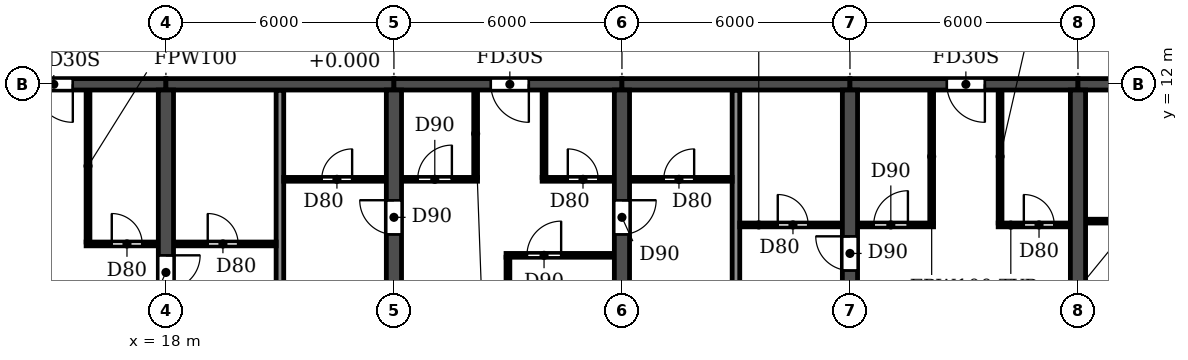
"""IFC4 building model, lengths in metres.
Left out: names, types, materials, properties, quantities, classifications, styles, units other than length and angle.
Written with IfcOpenShell. Run it as: python <this file> out.ifc"""

import sys

from ifc_helpers import new_model, si_unit, direction, frame, frame_2d, origin, place, context, subcontext, project, spatial, rectangle, extrude, element, fill, save


model = new_model("IFC4")
c1 = context("Model", 3, precision=1e-05, world=origin(), true_north=direction((0.0, 1.0)))
c2 = subcontext(c1, "Body", "Model", "MODEL_VIEW")
j1 = project(units=[si_unit("LENGTHUNIT", "METRE"), si_unit("PLANEANGLEUNIT", "RADIAN")], contexts=[c1])
p1 = place(None, origin())
s1 = spatial("IfcSite", under=j1, at=p1, CompositionType="ELEMENT")
p2 = place(p1, origin())
s2 = spatial("IfcBuilding", under=s1, at=p2, CompositionType="ELEMENT")
p3 = place(p2, frame((0.0, 0.0, 49.8)))
s3 = spatial("IfcBuildingStorey", under=s2, at=p3, CompositionType="ELEMENT", Elevation=49.8)
p4 = place(p3, frame((18.0, 0.2, 0.0), z_axis=(0.0, 0.0, 1.0), x_axis=(0.0, 1.0, 0.0)))
e1 = element("IfcWall", 1, at=p4, inside=s3, PredefinedType="SHEAR", context=c2, shape_type="SweptSolid", body=[
    extrude(rectangle(XDim=11.65, YDim=0.4, at=frame_2d((5.825, 0.0))), origin(), (0.0, 0.0, 1.0), 3.0),
])
p5 = place(p4, frame((6.4, 0.0, 0.0)))
e2 = element("IfcOpeningElement", 2, at=p5, cuts=e1, PredefinedType="OPENING", context=c2, shape_type="SweptSolid", body=[
    extrude(rectangle(XDim=0.9, YDim=2.1, at=frame_2d((0.45, 1.05))), frame((0.0, 0.21, 0.0), z_axis=(0.0, -1.0, 0.0), x_axis=(1.0, 0.0, 0.0)), (0.0, 0.0, 1.0), 0.42),
])
p6 = place(p3, frame((24.0, 0.2, 0.0), z_axis=(0.0, 0.0, 1.0), x_axis=(0.0, 1.0, 0.0)))
e3 = element("IfcWall", 3, at=p6, inside=s3, PredefinedType="SHEAR", context=c2, shape_type="SweptSolid", body=[
    extrude(rectangle(XDim=11.65, YDim=0.4, at=frame_2d((5.825, 0.0))), origin(), (0.0, 0.0, 1.0), 3.0),
])
p7 = place(p6, frame((7.85, 0.0, 0.0)))
e4 = element("IfcOpeningElement", 4, at=p7, cuts=e3, PredefinedType="OPENING", context=c2, shape_type="SweptSolid", body=[
    extrude(rectangle(XDim=0.9, YDim=2.1, at=frame_2d((0.45, 1.05))), frame((0.0, 0.21, 0.0), z_axis=(0.0, -1.0, 0.0), x_axis=(1.0, 0.0, 0.0)), (0.0, 0.0, 1.0), 0.42),
])
p8 = place(p3, frame((30.0, 0.2, 0.0), z_axis=(0.0, 0.0, 1.0), x_axis=(0.0, 1.0, 0.0)))
e5 = element("IfcWall", 5, at=p8, inside=s3, PredefinedType="SHEAR", context=c2, shape_type="SweptSolid", body=[
    extrude(rectangle(XDim=11.65, YDim=0.4, at=frame_2d((5.825, 0.0))), origin(), (0.0, 0.0, 1.0), 3.0),
])
p9 = place(p8, frame((7.85, 0.0, 0.0)))
e6 = element("IfcOpeningElement", 6, at=p9, cuts=e5, PredefinedType="OPENING", context=c2, shape_type="SweptSolid", body=[
    extrude(rectangle(XDim=0.9, YDim=2.1, at=frame_2d((0.45, 1.05))), frame((0.0, 0.21, 0.0), z_axis=(0.0, -1.0, 0.0), x_axis=(1.0, 0.0, 0.0)), (0.0, 0.0, 1.0), 0.42),
])
p10 = place(p3, frame((36.0, 0.2, 0.0), z_axis=(0.0, 0.0, 1.0), x_axis=(0.0, 1.0, 0.0)))
e7 = element("IfcWall", 7, at=p10, inside=s3, PredefinedType="SHEAR", context=c2, shape_type="SweptSolid", body=[
    extrude(rectangle(XDim=11.65, YDim=0.4, at=frame_2d((5.825, 0.0))), origin(), (0.0, 0.0, 1.0), 3.0),
])
p11 = place(p10, frame((6.9, 0.0, 0.0)))
e8 = element("IfcOpeningElement", 8, at=p11, cuts=e7, PredefinedType="OPENING", context=c2, shape_type="SweptSolid", body=[
    extrude(rectangle(XDim=0.9, YDim=2.1, at=frame_2d((0.45, 1.05))), frame((0.0, 0.21, 0.0), z_axis=(0.0, -1.0, 0.0), x_axis=(1.0, 0.0, 0.0)), (0.0, 0.0, 1.0), 0.42),
])
p12 = place(p3, frame((42.0, 0.2, 0.0), z_axis=(0.0, 0.0, 1.0), x_axis=(0.0, 1.0, 0.0)))
e9 = element("IfcWall", 9, at=p12, inside=s3, PredefinedType="SHEAR", context=c2, shape_type="SweptSolid", body=[
    extrude(rectangle(XDim=11.65, YDim=0.4, at=frame_2d((5.825, 0.0))), origin(), (0.0, 0.0, 1.0), 3.0),
])
p13 = place(p3, frame((12.0, 12.0, 0.0), z_axis=(0.0, 0.0, 1.0), x_axis=(1.0, 0.0, 0.0)))
e10 = element("IfcWall", 10, at=p13, inside=s3, PredefinedType="SHEAR", context=c2, shape_type="SweptSolid", body=[
    extrude(rectangle(XDim=6.0, YDim=0.3, at=frame_2d((3.0, 0.0))), origin(), (0.0, 0.0, 1.0), 2.4),
])
p14 = place(p13, frame((2.55, 0.0, 0.0)))
e11 = element("IfcOpeningElement", 11, at=p14, cuts=e10, PredefinedType="OPENING", context=c2, shape_type="SweptSolid", body=[
    extrude(rectangle(XDim=1.0, YDim=2.1, at=frame_2d((0.5, 1.05))), frame((0.0, 0.16, 0.0), z_axis=(0.0, -1.0, 0.0), x_axis=(1.0, 0.0, 0.0)), (0.0, 0.0, 1.0), 0.32),
])
p15 = place(p3, frame((18.0, 12.0, 0.0), z_axis=(0.0, 0.0, 1.0), x_axis=(1.0, 0.0, 0.0)))
e12 = element("IfcWall", 12, at=p15, inside=s3, PredefinedType="SHEAR", context=c2, shape_type="SweptSolid", body=[
    extrude(rectangle(XDim=6.0, YDim=0.3, at=frame_2d((3.0, 0.0))), origin(), (0.0, 0.0, 1.0), 2.4),
])
p16 = place(p3, frame((24.0, 12.0, 0.0), z_axis=(0.0, 0.0, 1.0), x_axis=(1.0, 0.0, 0.0)))
e13 = element("IfcWall", 13, at=p16, inside=s3, PredefinedType="SHEAR", context=c2, shape_type="SweptSolid", body=[
    extrude(rectangle(XDim=6.0, YDim=0.3, at=frame_2d((3.0, 0.0))), origin(), (0.0, 0.0, 1.0), 2.4),
])
p17 = place(p16, frame((2.55, 0.0, 0.0)))
e14 = element("IfcOpeningElement", 14, at=p17, cuts=e13, PredefinedType="OPENING", context=c2, shape_type="SweptSolid", body=[
    extrude(rectangle(XDim=1.0, YDim=2.1, at=frame_2d((0.5, 1.05))), frame((0.0, 0.16, 0.0), z_axis=(0.0, -1.0, 0.0), x_axis=(1.0, 0.0, 0.0)), (0.0, 0.0, 1.0), 0.32),
])
p18 = place(p3, frame((30.0, 12.0, 0.0), z_axis=(0.0, 0.0, 1.0), x_axis=(1.0, 0.0, 0.0)))
e15 = element("IfcWall", 15, at=p18, inside=s3, PredefinedType="SHEAR", context=c2, shape_type="SweptSolid", body=[
    extrude(rectangle(XDim=6.0, YDim=0.3, at=frame_2d((3.0, 0.0))), origin(), (0.0, 0.0, 1.0), 2.4),
])
p19 = place(p3, frame((36.0, 12.0, 0.0), z_axis=(0.0, 0.0, 1.0), x_axis=(1.0, 0.0, 0.0)))
e16 = element("IfcWall", 16, at=p19, inside=s3, PredefinedType="SHEAR", context=c2, shape_type="SweptSolid", body=[
    extrude(rectangle(XDim=6.0, YDim=0.3, at=frame_2d((3.0, 0.0))), origin(), (0.0, 0.0, 1.0), 2.4),
])
p20 = place(p19, frame((2.55, 0.0, 0.0)))
e17 = element("IfcOpeningElement", 17, at=p20, cuts=e16, PredefinedType="OPENING", context=c2, shape_type="SweptSolid", body=[
    extrude(rectangle(XDim=1.0, YDim=2.1, at=frame_2d((0.5, 1.05))), frame((0.0, 0.16, 0.0), z_axis=(0.0, -1.0, 0.0), x_axis=(1.0, 0.0, 0.0)), (0.0, 0.0, 1.0), 0.32),
])
p21 = place(p3, frame((42.0, 12.0, 0.0), z_axis=(0.0, 0.0, 1.0), x_axis=(1.0, 0.0, 0.0)))
e18 = element("IfcWall", 18, at=p21, inside=s3, PredefinedType="SHEAR", context=c2, shape_type="SweptSolid", body=[
    extrude(rectangle(XDim=6.0, YDim=0.3, at=frame_2d((3.0, 0.0))), origin(), (0.0, 0.0, 1.0), 2.4),
])
p22 = place(p21, frame((2.45, 0.0, 0.0)))
e19 = element("IfcOpeningElement", 19, at=p22, cuts=e18, PredefinedType="OPENING", context=c2, shape_type="SweptSolid", body=[
    extrude(rectangle(XDim=1.0, YDim=2.1, at=frame_2d((0.5, 1.05))), frame((0.0, 0.16, 0.0), z_axis=(0.0, -1.0, 0.0), x_axis=(1.0, 0.0, 0.0)), (0.0, 0.0, 1.0), 0.32),
])
for number, where, z_axis, x_axis in (
    (20, (21.0, 0.06, 0.0), (0.0, 0.0, 1.0), (0.0, 1.0, 0.0)),
    (21, (33.0, 0.06, 0.0), (0.0, 0.0, 1.0), (0.0, 1.0, 0.0)),
):
    element("IfcWall", number, at=place(p3, frame(where, z_axis=z_axis, x_axis=x_axis)), inside=s3, PredefinedType="PARTITIONING", context=c2, shape_type="SweptSolid", body=[
        extrude(rectangle(XDim=11.78, YDim=0.2, at=frame_2d((5.89, 0.0))), origin(), (0.0, 0.0, 1.0), 3.0),
    ])
p23 = place(p3, frame((26.95, 7.5, 0.0), z_axis=(0.0, 0.0, 1.0), x_axis=(1.0, 0.0, 0.0)))
e22 = element("IfcWall", 22, at=p23, inside=s3, PredefinedType="PARTITIONING", context=c2, shape_type="SweptSolid", body=[
    extrude(rectangle(XDim=2.84, YDim=0.1, at=frame_2d((1.42, 0.0))), origin(), (0.0, 0.0, 1.0), 3.0),
])
p24 = place(p23, frame((0.55, 0.0, 0.0)))
e23 = element("IfcOpeningElement", 23, at=p24, cuts=e22, PredefinedType="OPENING", context=c2, shape_type="SweptSolid", body=[
    extrude(rectangle(XDim=0.9, YDim=2.1, at=frame_2d((0.45, 1.05))), frame((0.0, 0.06, 0.0), z_axis=(0.0, -1.0, 0.0), x_axis=(1.0, 0.0, 0.0)), (0.0, 0.0, 1.0), 0.12),
])
p25 = place(p3, frame((15.9, 7.8, 0.0), z_axis=(0.0, 0.0, 1.0), x_axis=(1.0, 0.0, 0.0)))
e24 = element("IfcWall", 24, at=p25, inside=s3, PredefinedType="PARTITIONING", context=c2, shape_type="SweptSolid", body=[
    extrude(rectangle(XDim=1.89, YDim=0.1, at=frame_2d((0.945, 0.0))), origin(), (0.0, 0.0, 1.0), 3.0),
])
p26 = place(p25, frame((0.675, 0.0, 0.0)))
e25 = element("IfcOpeningElement", 25, at=p26, cuts=e24, PredefinedType="OPENING", context=c2, shape_type="SweptSolid", body=[
    extrude(rectangle(XDim=0.8, YDim=2.1, at=frame_2d((0.4, 1.05))), frame((0.0, 0.06, 0.0), z_axis=(0.0, -1.0, 0.0), x_axis=(1.0, 0.0, 0.0)), (0.0, 0.0, 1.0), 0.12),
])
p27 = place(p3, frame((18.21, 7.8, 0.0), z_axis=(0.0, 0.0, 1.0), x_axis=(1.0, 0.0, 0.0)))
e26 = element("IfcWall", 26, at=p27, inside=s3, PredefinedType="PARTITIONING", context=c2, shape_type="SweptSolid", body=[
    extrude(rectangle(XDim=2.69, YDim=0.1, at=frame_2d((1.345, 0.0))), origin(), (0.0, 0.0, 1.0), 3.0),
])
p28 = place(p27, frame((0.89, 0.0, 0.0)))
e27 = element("IfcOpeningElement", 27, at=p28, cuts=e26, PredefinedType="OPENING", context=c2, shape_type="SweptSolid", body=[
    extrude(rectangle(XDim=0.8, YDim=2.1, at=frame_2d((0.4, 1.05))), frame((0.0, 0.06, 0.0), z_axis=(0.0, -1.0, 0.0), x_axis=(1.0, 0.0, 0.0)), (0.0, 0.0, 1.0), 0.12),
])
p29 = place(p3, frame((33.1, 8.3, 0.0), z_axis=(0.0, 0.0, 1.0), x_axis=(1.0, 0.0, 0.0)))
e28 = element("IfcWall", 28, at=p29, inside=s3, PredefinedType="PARTITIONING", context=c2, shape_type="SweptSolid", body=[
    extrude(rectangle(XDim=2.69, YDim=0.1, at=frame_2d((1.345, 0.0))), origin(), (0.0, 0.0, 1.0), 3.0),
])
p30 = place(p29, frame((1.0, 0.0, 0.0)))
e29 = element("IfcOpeningElement", 29, at=p30, cuts=e28, PredefinedType="OPENING", context=c2, shape_type="SweptSolid", body=[
    extrude(rectangle(XDim=0.8, YDim=2.1, at=frame_2d((0.4, 1.05))), frame((0.0, 0.06, 0.0), z_axis=(0.0, -1.0, 0.0), x_axis=(1.0, 0.0, 0.0)), (0.0, 0.0, 1.0), 0.12),
])
p31 = place(p3, frame((36.21, 8.3, 0.0), z_axis=(0.0, 0.0, 1.0), x_axis=(1.0, 0.0, 0.0)))
e30 = element("IfcWall", 30, at=p31, inside=s3, PredefinedType="PARTITIONING", context=c2, shape_type="SweptSolid", body=[
    extrude(rectangle(XDim=1.99, YDim=0.1, at=frame_2d((0.995, 0.0))), origin(), (0.0, 0.0, 1.0), 3.0),
])
p32 = place(p31, frame((0.415, 0.0, 0.0)))
e31 = element("IfcOpeningElement", 31, at=p32, cuts=e30, PredefinedType="OPENING", context=c2, shape_type="SweptSolid", body=[
    extrude(rectangle(XDim=0.9, YDim=2.1, at=frame_2d((0.45, 1.05))), frame((0.0, 0.06, 0.0), z_axis=(0.0, -1.0, 0.0), x_axis=(1.0, 0.0, 0.0)), (0.0, 0.0, 1.0), 0.12),
])
p33 = place(p3, frame((39.9, 8.3, 0.0), z_axis=(0.0, 0.0, 1.0), x_axis=(1.0, 0.0, 0.0)))
e32 = element("IfcWall", 32, at=p33, inside=s3, PredefinedType="PARTITIONING", context=c2, shape_type="SweptSolid", body=[
    extrude(rectangle(XDim=1.89, YDim=0.1, at=frame_2d((0.945, 0.0))), origin(), (0.0, 0.0, 1.0), 3.0),
])
p34 = place(p33, frame((0.675, 0.0, 0.0)))
e33 = element("IfcOpeningElement", 33, at=p34, cuts=e32, PredefinedType="OPENING", context=c2, shape_type="SweptSolid", body=[
    extrude(rectangle(XDim=0.8, YDim=2.1, at=frame_2d((0.4, 1.05))), frame((0.0, 0.06, 0.0), z_axis=(0.0, -1.0, 0.0), x_axis=(1.0, 0.0, 0.0)), (0.0, 0.0, 1.0), 0.12),
])
p35 = place(p3, frame((42.21, 8.4, 0.0), z_axis=(0.0, 0.0, 1.0), x_axis=(1.0, 0.0, 0.0)))
e34 = element("IfcWall", 34, at=p35, inside=s3, PredefinedType="PARTITIONING", context=c2, shape_type="SweptSolid", body=[
    extrude(rectangle(XDim=1.89, YDim=0.1, at=frame_2d((0.945, 0.0))), origin(), (0.0, 0.0, 1.0), 3.0),
])
p36 = place(p3, frame((21.1, 9.5, 0.0), z_axis=(0.0, 0.0, 1.0), x_axis=(1.0, 0.0, 0.0)))
e35 = element("IfcWall", 35, at=p36, inside=s3, PredefinedType="PARTITIONING", context=c2, shape_type="SweptSolid", body=[
    extrude(rectangle(XDim=2.69, YDim=0.1, at=frame_2d((1.345, 0.0))), origin(), (0.0, 0.0, 1.0), 3.0),
])
p37 = place(p36, frame((1.0, 0.0, 0.0)))
e36 = element("IfcOpeningElement", 36, at=p37, cuts=e35, PredefinedType="OPENING", context=c2, shape_type="SweptSolid", body=[
    extrude(rectangle(XDim=0.8, YDim=2.1, at=frame_2d((0.4, 1.05))), frame((0.0, 0.06, 0.0), z_axis=(0.0, -1.0, 0.0), x_axis=(1.0, 0.0, 0.0)), (0.0, 0.0, 1.0), 0.12),
])
p38 = place(p3, frame((24.21, 9.5, 0.0), z_axis=(0.0, 0.0, 1.0), x_axis=(1.0, 0.0, 0.0)))
e37 = element("IfcWall", 37, at=p38, inside=s3, PredefinedType="PARTITIONING", context=c2, shape_type="SweptSolid", body=[
    extrude(rectangle(XDim=1.99, YDim=0.1, at=frame_2d((0.995, 0.0))), origin(), (0.0, 0.0, 1.0), 3.0),
])
p39 = place(p38, frame((0.415, 0.0, 0.0)))
e38 = element("IfcOpeningElement", 38, at=p39, cuts=e37, PredefinedType="OPENING", context=c2, shape_type="SweptSolid", body=[
    extrude(rectangle(XDim=0.9, YDim=2.1, at=frame_2d((0.45, 1.05))), frame((0.0, 0.06, 0.0), z_axis=(0.0, -1.0, 0.0), x_axis=(1.0, 0.0, 0.0)), (0.0, 0.0, 1.0), 0.12),
])
p40 = place(p3, frame((27.9, 9.5, 0.0), z_axis=(0.0, 0.0, 1.0), x_axis=(1.0, 0.0, 0.0)))
e39 = element("IfcWall", 39, at=p40, inside=s3, PredefinedType="PARTITIONING", context=c2, shape_type="SweptSolid", body=[
    extrude(rectangle(XDim=1.89, YDim=0.1, at=frame_2d((0.945, 0.0))), origin(), (0.0, 0.0, 1.0), 3.0),
])
p41 = place(p40, frame((0.675, 0.0, 0.0)))
e40 = element("IfcOpeningElement", 40, at=p41, cuts=e39, PredefinedType="OPENING", context=c2, shape_type="SweptSolid", body=[
    extrude(rectangle(XDim=0.8, YDim=2.1, at=frame_2d((0.4, 1.05))), frame((0.0, 0.06, 0.0), z_axis=(0.0, -1.0, 0.0), x_axis=(1.0, 0.0, 0.0)), (0.0, 0.0, 1.0), 0.12),
])
p42 = place(p3, frame((30.21, 9.5, 0.0), z_axis=(0.0, 0.0, 1.0), x_axis=(1.0, 0.0, 0.0)))
e41 = element("IfcWall", 41, at=p42, inside=s3, PredefinedType="PARTITIONING", context=c2, shape_type="SweptSolid", body=[
    extrude(rectangle(XDim=2.69, YDim=0.1, at=frame_2d((1.345, 0.0))), origin(), (0.0, 0.0, 1.0), 3.0),
])
p43 = place(p42, frame((0.89, 0.0, 0.0)))
e42 = element("IfcOpeningElement", 42, at=p43, cuts=e41, PredefinedType="OPENING", context=c2, shape_type="SweptSolid", body=[
    extrude(rectangle(XDim=0.8, YDim=2.1, at=frame_2d((0.4, 1.05))), frame((0.0, 0.06, 0.0), z_axis=(0.0, -1.0, 0.0), x_axis=(1.0, 0.0, 0.0)), (0.0, 0.0, 1.0), 0.12),
])
p44 = place(p3, frame((15.95, 7.85, 0.0), z_axis=(0.0, 0.0, 1.0), x_axis=(0.0, 1.0, 0.0)))
e43 = element("IfcWall", 43, at=p44, inside=s3, PredefinedType="PARTITIONING", context=c2, shape_type="SweptSolid", body=[
    extrude(rectangle(XDim=3.99, YDim=0.1, at=frame_2d((1.995, 0.0))), origin(), (0.0, 0.0, 1.0), 3.0),
])
p45 = place(p3, frame((26.15, 9.55, 0.0), z_axis=(0.0, 0.0, 1.0), x_axis=(0.0, 1.0, 0.0)))
e44 = element("IfcWall", 44, at=p45, inside=s3, PredefinedType="PARTITIONING", context=c2, shape_type="SweptSolid", body=[
    extrude(rectangle(XDim=2.29, YDim=0.1, at=frame_2d((1.145, 0.0))), origin(), (0.0, 0.0, 1.0), 3.0),
])
p46 = place(p3, frame((27.0, 0.06, 0.0), z_axis=(0.0, 0.0, 1.0), x_axis=(0.0, 1.0, 0.0)))
e45 = element("IfcWall", 45, at=p46, inside=s3, PredefinedType="PARTITIONING", context=c2, shape_type="SweptSolid", body=[
    extrude(rectangle(XDim=7.39, YDim=0.1, at=frame_2d((3.695, 0.0))), origin(), (0.0, 0.0, 1.0), 3.0),
])
p47 = place(p3, frame((27.95, 9.55, 0.0), z_axis=(0.0, 0.0, 1.0), x_axis=(0.0, 1.0, 0.0)))
e46 = element("IfcWall", 46, at=p47, inside=s3, PredefinedType="PARTITIONING", context=c2, shape_type="SweptSolid", body=[
    extrude(rectangle(XDim=2.29, YDim=0.1, at=frame_2d((1.145, 0.0))), origin(), (0.0, 0.0, 1.0), 3.0),
])
for number, where, z_axis, x_axis in (
    (47, (38.15, 8.35, 0.0), (0.0, 0.0, 1.0), (0.0, 1.0, 0.0)),
    (48, (39.95, 8.35, 0.0), (0.0, 0.0, 1.0), (0.0, 1.0, 0.0)),
):
    element("IfcWall", number, at=place(p3, frame(where, z_axis=z_axis, x_axis=x_axis)), inside=s3, PredefinedType="PARTITIONING", context=c2, shape_type="SweptSolid", body=[
        extrude(rectangle(XDim=3.49, YDim=0.1, at=frame_2d((1.745, 0.0))), origin(), (0.0, 0.0, 1.0), 3.0),
    ])
p48 = place(p28, origin())
e49 = element("IfcDoor", 49, at=p48, inside=s3, OperationType="SINGLE_SWING_LEFT", PredefinedType="DOOR", context=c2, shape_type="SweptSolid", body=[
    extrude(rectangle(XDim=0.8, YDim=2.1, at=frame_2d((0.4, 1.05))), frame((0.0, 0.025, 0.0), z_axis=(0.0, -1.0, 0.0), x_axis=(1.0, 0.0, 0.0)), (0.0, 0.0, 1.0), 0.05),
])
fill(e27, e49)
p49 = place(p14, frame((1.0, 0.0, 0.0), z_axis=(0.0, 0.0, 1.0), x_axis=(-1.0, 0.0, 0.0)))
e50 = element("IfcDoor", 50, at=p49, inside=s3, OperationType="SINGLE_SWING_LEFT", PredefinedType="DOOR", context=c2, shape_type="SweptSolid", body=[
    extrude(rectangle(XDim=1.0, YDim=2.1, at=frame_2d((0.5, 1.05))), frame((0.0, 0.025, 0.0), z_axis=(0.0, -1.0, 0.0), x_axis=(1.0, 0.0, 0.0)), (0.0, 0.0, 1.0), 0.05),
])
fill(e11, e50)
p50 = place(p26, origin())
e51 = element("IfcDoor", 51, at=p50, inside=s3, OperationType="SINGLE_SWING_LEFT", PredefinedType="DOOR", context=c2, shape_type="SweptSolid", body=[
    extrude(rectangle(XDim=0.8, YDim=2.1, at=frame_2d((0.4, 1.05))), frame((0.0, 0.025, 0.0), z_axis=(0.0, -1.0, 0.0), x_axis=(1.0, 0.0, 0.0)), (0.0, 0.0, 1.0), 0.05),
])
fill(e25, e51)
p51 = place(p5, frame((0.9, 0.0, 0.0), z_axis=(0.0, 0.0, 1.0), x_axis=(-1.0, 0.0, 0.0)))
e52 = element("IfcDoor", 52, at=p51, inside=s3, OperationType="SINGLE_SWING_LEFT", PredefinedType="DOOR", context=c2, shape_type="SweptSolid", body=[
    extrude(rectangle(XDim=0.9, YDim=2.1, at=frame_2d((0.45, 1.05))), frame((0.0, 0.025, 0.0), z_axis=(0.0, -1.0, 0.0), x_axis=(1.0, 0.0, 0.0)), (0.0, 0.0, 1.0), 0.05),
])
fill(e2, e52)
p52 = place(p37, origin())
e53 = element("IfcDoor", 53, at=p52, inside=s3, OperationType="SINGLE_SWING_RIGHT", PredefinedType="DOOR", context=c2, shape_type="SweptSolid", body=[
    extrude(rectangle(XDim=0.8, YDim=2.1, at=frame_2d((0.4, 1.05))), frame((0.0, 0.025, 0.0), z_axis=(0.0, -1.0, 0.0), x_axis=(1.0, 0.0, 0.0)), (0.0, 0.0, 1.0), 0.05),
])
fill(e36, e53)
p53 = place(p43, origin())
e54 = element("IfcDoor", 54, at=p53, inside=s3, OperationType="SINGLE_SWING_RIGHT", PredefinedType="DOOR", context=c2, shape_type="SweptSolid", body=[
    extrude(rectangle(XDim=0.8, YDim=2.1, at=frame_2d((0.4, 1.05))), frame((0.0, 0.025, 0.0), z_axis=(0.0, -1.0, 0.0), x_axis=(1.0, 0.0, 0.0)), (0.0, 0.0, 1.0), 0.05),
])
fill(e42, e54)
p54 = place(p7, origin())
e55 = element("IfcDoor", 55, at=p54, inside=s3, OperationType="SINGLE_SWING_RIGHT", PredefinedType="DOOR", context=c2, shape_type="SweptSolid", body=[
    extrude(rectangle(XDim=0.9, YDim=2.1, at=frame_2d((0.45, 1.05))), frame((0.0, 0.025, 0.0), z_axis=(0.0, -1.0, 0.0), x_axis=(1.0, 0.0, 0.0)), (0.0, 0.0, 1.0), 0.05),
])
fill(e4, e55)
p55 = place(p39, origin())
e56 = element("IfcDoor", 56, at=p55, inside=s3, OperationType="SINGLE_SWING_RIGHT", PredefinedType="DOOR", context=c2, shape_type="SweptSolid", body=[
    extrude(rectangle(XDim=0.9, YDim=2.1, at=frame_2d((0.45, 1.05))), frame((0.0, 0.025, 0.0), z_axis=(0.0, -1.0, 0.0), x_axis=(1.0, 0.0, 0.0)), (0.0, 0.0, 1.0), 0.05),
])
fill(e38, e56)
p56 = place(p17, frame((1.0, 0.0, 0.0), z_axis=(0.0, 0.0, 1.0), x_axis=(-1.0, 0.0, 0.0)))
e57 = element("IfcDoor", 57, at=p56, inside=s3, OperationType="SINGLE_SWING_LEFT", PredefinedType="DOOR", context=c2, shape_type="SweptSolid", body=[
    extrude(rectangle(XDim=1.0, YDim=2.1, at=frame_2d((0.5, 1.05))), frame((0.0, 0.025, 0.0), z_axis=(0.0, -1.0, 0.0), x_axis=(1.0, 0.0, 0.0)), (0.0, 0.0, 1.0), 0.05),
])
fill(e14, e57)
p57 = place(p24, origin())
e58 = element("IfcDoor", 58, at=p57, inside=s3, OperationType="SINGLE_SWING_RIGHT", PredefinedType="DOOR", context=c2, shape_type="SweptSolid", body=[
    extrude(rectangle(XDim=0.9, YDim=2.1, at=frame_2d((0.45, 1.05))), frame((0.0, 0.025, 0.0), z_axis=(0.0, -1.0, 0.0), x_axis=(1.0, 0.0, 0.0)), (0.0, 0.0, 1.0), 0.05),
])
fill(e23, e58)
p58 = place(p41, origin())
e59 = element("IfcDoor", 59, at=p58, inside=s3, OperationType="SINGLE_SWING_LEFT", PredefinedType="DOOR", context=c2, shape_type="SweptSolid", body=[
    extrude(rectangle(XDim=0.8, YDim=2.1, at=frame_2d((0.4, 1.05))), frame((0.0, 0.025, 0.0), z_axis=(0.0, -1.0, 0.0), x_axis=(1.0, 0.0, 0.0)), (0.0, 0.0, 1.0), 0.05),
])
fill(e40, e59)
p59 = place(p9, frame((0.9, 0.0, 0.0), z_axis=(0.0, 0.0, 1.0), x_axis=(-1.0, 0.0, 0.0)))
e60 = element("IfcDoor", 60, at=p59, inside=s3, OperationType="SINGLE_SWING_LEFT", PredefinedType="DOOR", context=c2, shape_type="SweptSolid", body=[
    extrude(rectangle(XDim=0.9, YDim=2.1, at=frame_2d((0.45, 1.05))), frame((0.0, 0.025, 0.0), z_axis=(0.0, -1.0, 0.0), x_axis=(1.0, 0.0, 0.0)), (0.0, 0.0, 1.0), 0.05),
])
fill(e6, e60)
p60 = place(p30, origin())
e61 = element("IfcDoor", 61, at=p60, inside=s3, OperationType="SINGLE_SWING_LEFT", PredefinedType="DOOR", context=c2, shape_type="SweptSolid", body=[
    extrude(rectangle(XDim=0.8, YDim=2.1, at=frame_2d((0.4, 1.05))), frame((0.0, 0.025, 0.0), z_axis=(0.0, -1.0, 0.0), x_axis=(1.0, 0.0, 0.0)), (0.0, 0.0, 1.0), 0.05),
])
fill(e29, e61)
p61 = place(p11, origin())
e62 = element("IfcDoor", 62, at=p61, inside=s3, OperationType="SINGLE_SWING_RIGHT", PredefinedType="DOOR", context=c2, shape_type="SweptSolid", body=[
    extrude(rectangle(XDim=0.9, YDim=2.1, at=frame_2d((0.45, 1.05))), frame((0.0, 0.025, 0.0), z_axis=(0.0, -1.0, 0.0), x_axis=(1.0, 0.0, 0.0)), (0.0, 0.0, 1.0), 0.05),
])
fill(e8, e62)
p62 = place(p32, origin())
e63 = element("IfcDoor", 63, at=p62, inside=s3, OperationType="SINGLE_SWING_RIGHT", PredefinedType="DOOR", context=c2, shape_type="SweptSolid", body=[
    extrude(rectangle(XDim=0.9, YDim=2.1, at=frame_2d((0.45, 1.05))), frame((0.0, 0.025, 0.0), z_axis=(0.0, -1.0, 0.0), x_axis=(1.0, 0.0, 0.0)), (0.0, 0.0, 1.0), 0.05),
])
fill(e31, e63)
p63 = place(p20, frame((1.0, 0.0, 0.0), z_axis=(0.0, 0.0, 1.0), x_axis=(-1.0, 0.0, 0.0)))
e64 = element("IfcDoor", 64, at=p63, inside=s3, OperationType="SINGLE_SWING_LEFT", PredefinedType="DOOR", context=c2, shape_type="SweptSolid", body=[
    extrude(rectangle(XDim=1.0, YDim=2.1, at=frame_2d((0.5, 1.05))), frame((0.0, 0.025, 0.0), z_axis=(0.0, -1.0, 0.0), x_axis=(1.0, 0.0, 0.0)), (0.0, 0.0, 1.0), 0.05),
])
fill(e17, e64)
p64 = place(p34, origin())
e65 = element("IfcDoor", 65, at=p64, inside=s3, OperationType="SINGLE_SWING_LEFT", PredefinedType="DOOR", context=c2, shape_type="SweptSolid", body=[
    extrude(rectangle(XDim=0.8, YDim=2.1, at=frame_2d((0.4, 1.05))), frame((0.0, 0.025, 0.0), z_axis=(0.0, -1.0, 0.0), x_axis=(1.0, 0.0, 0.0)), (0.0, 0.0, 1.0), 0.05),
])
fill(e33, e65)
save(model, sys.argv[1])
